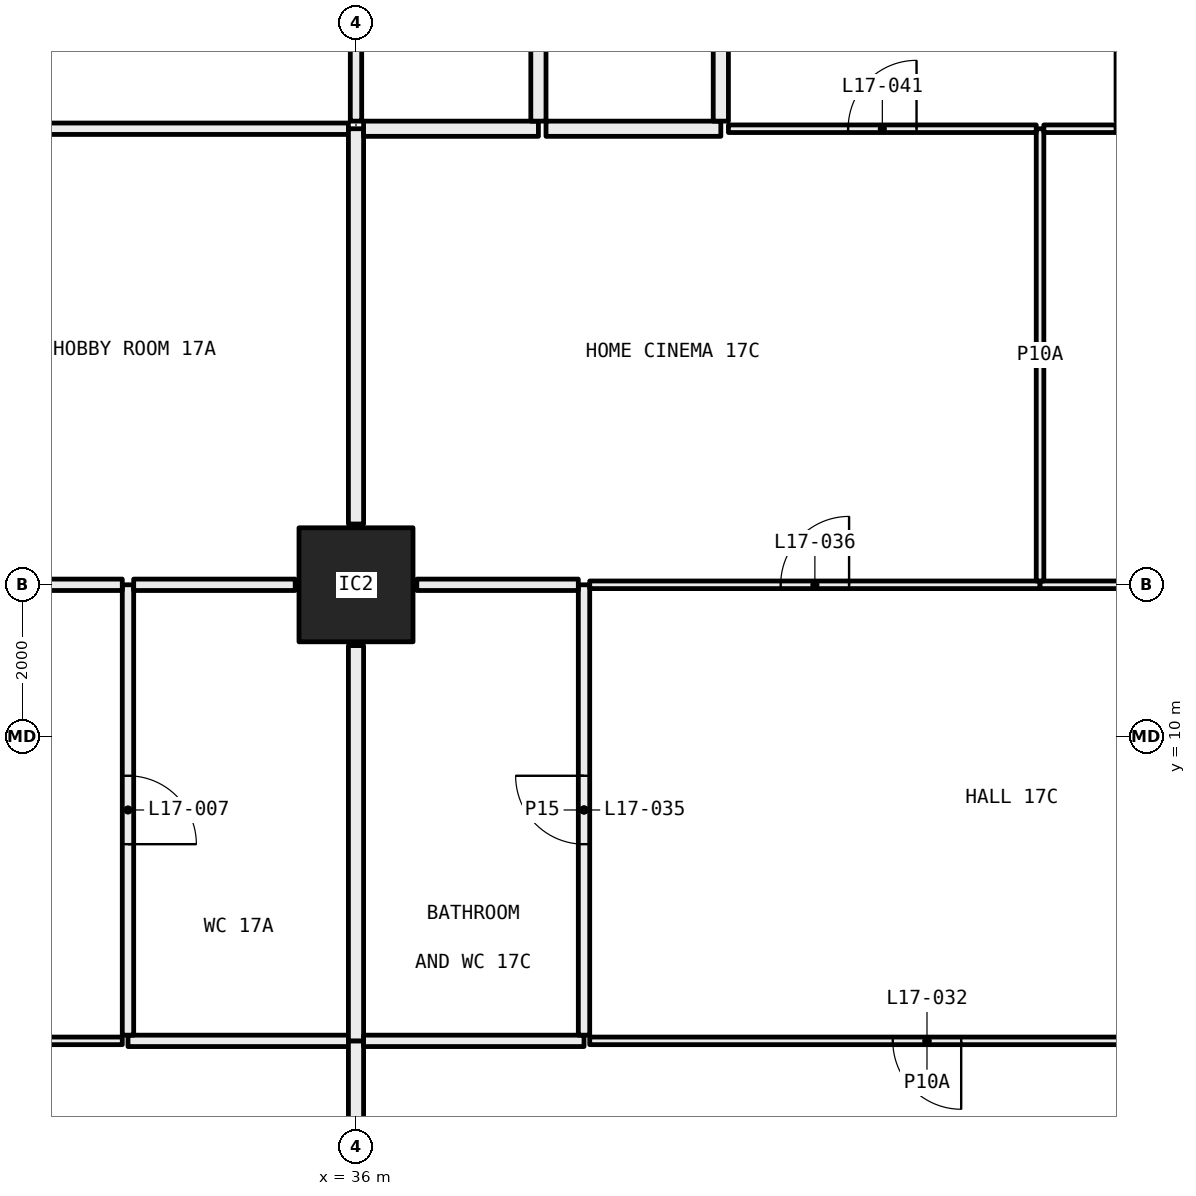
"""IFC4 building model, lengths in metres.
Left out: names, types, materials, properties, quantities, classifications, styles, units other than length and angle.
Written with IfcOpenShell. Run it as: python <this file> out.ifc"""

import sys

from ifc_helpers import new_model, si_unit, direction, frame, frame_2d, origin, origin_2d, place, context, subcontext, project, spatial, rectangle, hollow_rectangle, extrude, element, fill, save


model = new_model("IFC4")
c1 = context("Model", 3, precision=1e-05, world=origin(), true_north=direction((0.0, 1.0)))
c2 = subcontext(c1, "Body", "Model", "MODEL_VIEW")
j1 = project(units=[si_unit("LENGTHUNIT", "METRE"), si_unit("PLANEANGLEUNIT", "RADIAN")], contexts=[c1])
p1 = place(None, origin())
s1 = spatial("IfcSite", under=j1, at=p1, CompositionType="ELEMENT")
p2 = place(p1, origin())
s2 = spatial("IfcBuilding", under=s1, at=p2, CompositionType="ELEMENT")
p3 = place(p2, frame((0.0, 0.0, 71.4)))
s3 = spatial("IfcBuildingStorey", under=s2, at=p3, CompositionType="ELEMENT", Elevation=71.4)
p4 = place(p3, frame((36.0, 12.0, 0.0), z_axis=(0.0, 0.0, 1.0), x_axis=(1.0, 0.0, 0.0)))
e1 = element("IfcColumn", 1, at=p4, inside=s3, PredefinedType="COLUMN", context=c2, shape_type="SweptSolid", body=[
    extrude(hollow_rectangle(XDim=1.5, YDim=1.5, WallThickness=0.065, at=origin_2d()), origin(), (0.0, 0.0, 1.0), 3.05),
])
p5 = place(p3, frame((32.925, 6.0, 0.0), z_axis=(0.0, 0.0, 1.0), x_axis=(-1.0, 0.0, 0.0)))
e2 = element("IfcWall", 2, at=p5, inside=s3, PredefinedType="PARTITIONING", context=c2, shape_type="SweptSolid", body=[
    extrude(rectangle(XDim=2.875, YDim=0.1, at=frame_2d((1.438, 0.0))), origin(), (0.0, 0.0, 1.0), 3.05),
])
p6 = place(p3, frame((35.9, 6.0, 0.0), z_axis=(0.0, 0.0, 1.0), x_axis=(-1.0, 0.0, 0.0)))
e3 = element("IfcWall", 3, at=p6, inside=s3, PredefinedType="PARTITIONING", context=c2, shape_type="SweptSolid", body=[
    extrude(rectangle(XDim=2.9, YDim=0.15, at=frame_2d((1.45, 0.0))), origin(), (0.0, 0.0, 1.0), 3.05),
])
p7 = place(p3, frame((36.0, 0.72, 0.0), z_axis=(0.0, 0.0, 1.0), x_axis=(0.0, 1.0, 0.0)))
e4 = element("IfcWall", 4, at=p7, inside=s3, PredefinedType="PARTITIONING", context=c2, shape_type="SweptSolid", body=[
    extrude(rectangle(XDim=5.28, YDim=0.2, at=frame_2d((2.64, 0.0))), origin(), (0.0, 0.0, 1.0), 2.45),
])
p8 = place(p3, frame((33.0, 6.075, 0.0), z_axis=(0.0, 0.0, 1.0), x_axis=(0.0, 1.0, 0.0)))
e5 = element("IfcWall", 5, at=p8, inside=s3, PredefinedType="PARTITIONING", context=c2, shape_type="SweptSolid", body=[
    extrude(rectangle(XDim=5.925, YDim=0.15, at=frame_2d((2.962, 0.0))), origin(), (0.0, 0.0, 1.0), 2.45),
])
p9 = place(p8, frame((2.512, 0.0, 0.0)))
e6 = element("IfcOpeningElement", 6, at=p9, cuts=e5, PredefinedType="OPENING", context=c2, shape_type="SweptSolid", body=[
    extrude(rectangle(XDim=0.9, YDim=2.1, at=frame_2d((0.45, 1.05))), frame((0.0, 0.085, 0.0), z_axis=(0.0, -1.0, 0.0), x_axis=(1.0, 0.0, 0.0)), (0.0, 0.0, 1.0), 0.17),
])
p10 = place(p3, frame((32.925, 12.0, 0.0), z_axis=(0.0, 0.0, 1.0), x_axis=(-1.0, 0.0, 0.0)))
e7 = element("IfcWall", 7, at=p10, inside=s3, PredefinedType="PARTITIONING", context=c2, shape_type="SweptSolid", body=[
    extrude(rectangle(XDim=2.925, YDim=0.15, at=frame_2d((1.462, 0.0))), origin(), (0.0, 0.0, 1.0), 2.45),
])
p11 = place(p10, frame((1.012, 0.0, 0.0)))
e8 = element("IfcOpeningElement", 8, at=p11, cuts=e7, PredefinedType="OPENING", context=c2, shape_type="SweptSolid", body=[
    extrude(rectangle(XDim=0.9, YDim=2.1, at=frame_2d((0.45, 1.05))), frame((0.0, 0.085, 0.0), z_axis=(0.0, -1.0, 0.0), x_axis=(1.0, 0.0, 0.0)), (0.0, 0.0, 1.0), 0.17),
])
p12 = place(p3, frame((35.2, 12.0, 0.0), z_axis=(0.0, 0.0, 1.0), x_axis=(-1.0, 0.0, 0.0)))
e9 = element("IfcWall", 9, at=p12, inside=s3, PredefinedType="PARTITIONING", context=c2, shape_type="SweptSolid", body=[
    extrude(rectangle(XDim=2.125, YDim=0.15, at=frame_2d((1.062, 0.0))), origin(), (0.0, 0.0, 1.0), 2.45),
])
p13 = place(p3, frame((36.0, 6.0, 0.0), z_axis=(0.0, 0.0, 1.0), x_axis=(0.0, 1.0, 0.0)))
e10 = element("IfcWall", 10, at=p13, inside=s3, PredefinedType="PARTITIONING", context=c2, shape_type="SweptSolid", body=[
    extrude(rectangle(XDim=5.2, YDim=0.2, at=frame_2d((2.6, 0.0))), origin(), (0.0, 0.0, 1.0), 2.45),
])
p14 = place(p3, frame((35.9, 18.0, 0.0), z_axis=(0.0, 0.0, 1.0), x_axis=(-1.0, 0.0, 0.0)))
e11 = element("IfcWall", 11, at=p14, inside=s3, PredefinedType="PARTITIONING", context=c2, shape_type="SweptSolid", body=[
    extrude(rectangle(XDim=4.4, YDim=0.15, at=frame_2d((2.2, 0.0))), origin(), (0.0, 0.0, 1.0), 3.05),
])
p15 = place(p3, frame((36.0, 12.8, 0.0), z_axis=(0.0, 0.0, 1.0), x_axis=(0.0, 1.0, 0.0)))
e12 = element("IfcWall", 12, at=p15, inside=s3, PredefinedType="PARTITIONING", context=c2, shape_type="SweptSolid", body=[
    extrude(rectangle(XDim=5.2, YDim=0.2, at=frame_2d((2.6, 0.0))), origin(), (0.0, 0.0, 1.0), 2.45),
])
p16 = place(p3, frame((36.0, 18.1, 0.0), z_axis=(0.0, 0.0, 1.0), x_axis=(0.0, 1.0, 0.0)))
e13 = element("IfcWall", 13, at=p16, inside=s3, PredefinedType="PARTITIONING", context=c2, shape_type="SweptSolid", body=[
    extrude(rectangle(XDim=5.1, YDim=0.15, at=frame_2d((2.55, 0.0))), origin(), (0.0, 0.0, 1.0), 2.45),
])
p17 = place(p16, frame((2.1, 0.0, 0.0)))
e14 = element("IfcOpeningElement", 14, at=p17, cuts=e13, PredefinedType="OPENING", context=c2, shape_type="SweptSolid", body=[
    extrude(rectangle(XDim=0.9, YDim=2.1, at=frame_2d((0.45, 1.05))), frame((0.0, 0.085, 0.0), z_axis=(0.0, -1.0, 0.0), x_axis=(1.0, 0.0, 0.0)), (0.0, 0.0, 1.0), 0.17),
])
p18 = place(p3, frame((36.1, 18.0, 0.0), z_axis=(0.0, 0.0, 1.0), x_axis=(1.0, 0.0, 0.0)))
e15 = element("IfcWall", 15, at=p18, inside=s3, PredefinedType="PARTITIONING", context=c2, shape_type="SweptSolid", body=[
    extrude(rectangle(XDim=2.3, YDim=0.2, at=frame_2d((1.15, 0.0))), origin(), (0.0, 0.0, 1.0), 3.05),
])
p19 = place(p3, frame((38.4, 18.1, 0.0), z_axis=(0.0, 0.0, 1.0), x_axis=(0.0, 1.0, 0.0)))
e16 = element("IfcWall", 16, at=p19, inside=s3, PredefinedType="PARTITIONING", context=c2, shape_type="SweptSolid", body=[
    extrude(rectangle(XDim=6.2, YDim=0.2, at=frame_2d((3.1, 0.0))), origin(), (0.0, 0.0, 1.0), 2.45),
])
p20 = place(p3, frame((39.0, 6.0, 0.0), z_axis=(0.0, 0.0, 1.0), x_axis=(-1.0, 0.0, 0.0)))
e17 = element("IfcWall", 17, at=p20, inside=s3, PredefinedType="PARTITIONING", context=c2, shape_type="SweptSolid", body=[
    extrude(rectangle(XDim=2.9, YDim=0.15, at=frame_2d((1.45, 0.0))), origin(), (0.0, 0.0, 1.0), 3.05),
])
p21 = place(p3, frame((47.95, 6.0, 0.0), z_axis=(0.0, 0.0, 1.0), x_axis=(-1.0, 0.0, 0.0)))
e18 = element("IfcWall", 18, at=p21, inside=s3, PredefinedType="PARTITIONING", context=c2, shape_type="SweptSolid", body=[
    extrude(rectangle(XDim=8.875, YDim=0.1, at=frame_2d((4.438, 0.0))), origin(), (0.0, 0.0, 1.0), 2.45),
])
p22 = place(p21, frame((3.988, 0.0, 0.0)))
e19 = element("IfcOpeningElement", 19, at=p22, cuts=e18, PredefinedType="OPENING", context=c2, shape_type="SweptSolid", body=[
    extrude(rectangle(XDim=0.9, YDim=2.1, at=frame_2d((0.45, 1.05))), frame((0.0, 0.06, 0.0), z_axis=(0.0, -1.0, 0.0), x_axis=(1.0, 0.0, 0.0)), (0.0, 0.0, 1.0), 0.12),
])
p23 = place(p3, frame((39.0, 6.075, 0.0), z_axis=(0.0, 0.0, 1.0), x_axis=(0.0, 1.0, 0.0)))
e20 = element("IfcWall", 20, at=p23, inside=s3, PredefinedType="PARTITIONING", context=c2, shape_type="SweptSolid", body=[
    extrude(rectangle(XDim=5.925, YDim=0.15, at=frame_2d((2.962, 0.0))), origin(), (0.0, 0.0, 1.0), 2.45),
])
p24 = place(p23, frame((2.512, 0.0, 0.0)))
e21 = element("IfcOpeningElement", 21, at=p24, cuts=e20, PredefinedType="OPENING", context=c2, shape_type="SweptSolid", body=[
    extrude(rectangle(XDim=0.9, YDim=2.1, at=frame_2d((0.45, 1.05))), frame((0.0, 0.085, 0.0), z_axis=(0.0, -1.0, 0.0), x_axis=(1.0, 0.0, 0.0)), (0.0, 0.0, 1.0), 0.17),
])
p25 = place(p3, frame((38.925, 12.0, 0.0), z_axis=(0.0, 0.0, 1.0), x_axis=(-1.0, 0.0, 0.0)))
e22 = element("IfcWall", 22, at=p25, inside=s3, PredefinedType="PARTITIONING", context=c2, shape_type="SweptSolid", body=[
    extrude(rectangle(XDim=2.125, YDim=0.15, at=frame_2d((1.062, 0.0))), origin(), (0.0, 0.0, 1.0), 2.45),
])
p26 = place(p3, frame((45.0, 12.0, 0.0), z_axis=(0.0, 0.0, 1.0), x_axis=(-1.0, 0.0, 0.0)))
e23 = element("IfcWall", 23, at=p26, inside=s3, PredefinedType="PARTITIONING", context=c2, shape_type="SweptSolid", body=[
    extrude(rectangle(XDim=5.925, YDim=0.1, at=frame_2d((2.962, 0.0))), origin(), (0.0, 0.0, 1.0), 2.45),
])
p27 = place(p26, frame((2.512, 0.0, 0.0)))
e24 = element("IfcOpeningElement", 24, at=p27, cuts=e23, PredefinedType="OPENING", context=c2, shape_type="SweptSolid", body=[
    extrude(rectangle(XDim=0.9, YDim=2.1, at=frame_2d((0.45, 1.05))), frame((0.0, 0.06, 0.0), z_axis=(0.0, -1.0, 0.0), x_axis=(1.0, 0.0, 0.0)), (0.0, 0.0, 1.0), 0.12),
])
p28 = place(p3, frame((47.2, 12.0, 0.0), z_axis=(0.0, 0.0, 1.0), x_axis=(-1.0, 0.0, 0.0)))
e25 = element("IfcWall", 25, at=p28, inside=s3, PredefinedType="PARTITIONING", context=c2, shape_type="SweptSolid", body=[
    extrude(rectangle(XDim=2.2, YDim=0.1, at=frame_2d((1.1, 0.0))), origin(), (0.0, 0.0, 1.0), 2.45),
])
p29 = place(p3, frame((45.0, 12.05, 0.0), z_axis=(0.0, 0.0, 1.0), x_axis=(0.0, 1.0, 0.0)))
e26 = element("IfcWall", 26, at=p29, inside=s3, PredefinedType="PARTITIONING", context=c2, shape_type="SweptSolid", body=[
    extrude(rectangle(XDim=5.95, YDim=0.1, at=frame_2d((2.975, 0.0))), origin(), (0.0, 0.0, 1.0), 2.45),
])
p30 = place(p3, frame((44.95, 18.0, 0.0), z_axis=(0.0, 0.0, 1.0), x_axis=(-1.0, 0.0, 0.0)))
e27 = element("IfcWall", 27, at=p30, inside=s3, PredefinedType="PARTITIONING", context=c2, shape_type="SweptSolid", body=[
    extrude(rectangle(XDim=4.05, YDim=0.1, at=frame_2d((2.025, 0.0))), origin(), (0.0, 0.0, 1.0), 3.05),
])
p31 = place(p30, frame((1.575, 0.0, 0.0)))
e28 = element("IfcOpeningElement", 28, at=p31, cuts=e27, PredefinedType="OPENING", context=c2, shape_type="SweptSolid", body=[
    extrude(rectangle(XDim=0.9, YDim=2.1, at=frame_2d((0.45, 1.05))), frame((0.0, 0.06, 0.0), z_axis=(0.0, -1.0, 0.0), x_axis=(1.0, 0.0, 0.0)), (0.0, 0.0, 1.0), 0.12),
])
p32 = place(p3, frame((40.8, 18.0, 0.0), z_axis=(0.0, 0.0, 1.0), x_axis=(-1.0, 0.0, 0.0)))
e29 = element("IfcWall", 29, at=p32, inside=s3, PredefinedType="PARTITIONING", context=c2, shape_type="SweptSolid", body=[
    extrude(rectangle(XDim=2.3, YDim=0.2, at=frame_2d((1.15, 0.0))), origin(), (0.0, 0.0, 1.0), 3.05),
])
p33 = place(p3, frame((46.0, 18.0, 0.0), z_axis=(0.0, 0.0, 1.0), x_axis=(-1.0, 0.0, 0.0)))
e30 = element("IfcWall", 30, at=p33, inside=s3, PredefinedType="PARTITIONING", context=c2, shape_type="SweptSolid", body=[
    extrude(rectangle(XDim=0.95, YDim=0.1, at=frame_2d((0.475, 0.0))), origin(), (0.0, 0.0, 1.0), 3.05),
])
p34 = place(p3, frame((40.8, 23.9, 0.0), z_axis=(0.0, 0.0, 1.0), x_axis=(0.0, -1.0, 0.0)))
e31 = element("IfcWall", 31, at=p34, inside=s3, PredefinedType="PARTITIONING", context=c2, shape_type="SweptSolid", body=[
    extrude(rectangle(XDim=5.8, YDim=0.2, at=frame_2d((2.9, 0.0))), origin(), (0.0, 0.0, 1.0), 3.05),
])
p35 = place(p9, frame((0.9, 0.0, 0.0), x_axis=(-1.0, 0.0, 0.0)))
e32 = element("IfcDoor", 32, at=p35, inside=s3, OperationType="SINGLE_SWING_LEFT", PredefinedType="DOOR", context=c2, shape_type="SweptSolid", body=[
    extrude(rectangle(XDim=0.9, YDim=2.1, at=frame_2d((0.45, 1.05))), frame((0.0, 0.025, 0.0), z_axis=(0.0, -1.0, 0.0), x_axis=(1.0, 0.0, 0.0)), (0.0, 0.0, 1.0), 0.05),
])
fill(e6, e32)
p36 = place(p22, origin())
e33 = element("IfcDoor", 33, at=p36, inside=s3, OperationType="SINGLE_SWING_RIGHT", PredefinedType="DOOR", context=c2, shape_type="SweptSolid", body=[
    extrude(rectangle(XDim=0.9, YDim=2.1, at=frame_2d((0.45, 1.05))), frame((0.0, 0.025, 0.0), z_axis=(0.0, -1.0, 0.0), x_axis=(1.0, 0.0, 0.0)), (0.0, 0.0, 1.0), 0.05),
])
fill(e19, e33)
p37 = place(p24, origin())
e34 = element("IfcDoor", 34, at=p37, inside=s3, OperationType="SINGLE_SWING_LEFT", PredefinedType="DOOR", context=c2, shape_type="SweptSolid", body=[
    extrude(rectangle(XDim=0.9, YDim=2.1, at=frame_2d((0.45, 1.05))), frame((0.0, 0.025, 0.0), z_axis=(0.0, -1.0, 0.0), x_axis=(1.0, 0.0, 0.0)), (0.0, 0.0, 1.0), 0.05),
])
fill(e21, e34)
p38 = place(p27, frame((0.9, 0.0, 0.0), x_axis=(-1.0, 0.0, 0.0)))
e35 = element("IfcDoor", 35, at=p38, inside=s3, OperationType="SINGLE_SWING_LEFT", PredefinedType="DOOR", context=c2, shape_type="SweptSolid", body=[
    extrude(rectangle(XDim=0.9, YDim=2.1, at=frame_2d((0.45, 1.05))), frame((0.0, 0.025, 0.0), z_axis=(0.0, -1.0, 0.0), x_axis=(1.0, 0.0, 0.0)), (0.0, 0.0, 1.0), 0.05),
])
fill(e24, e35)
p39 = place(p31, frame((0.9, 0.0, 0.0), x_axis=(-1.0, 0.0, 0.0)))
e36 = element("IfcDoor", 36, at=p39, inside=s3, OperationType="SINGLE_SWING_LEFT", PredefinedType="DOOR", context=c2, shape_type="SweptSolid", body=[
    extrude(rectangle(XDim=0.9, YDim=2.1, at=frame_2d((0.45, 1.05))), frame((0.0, 0.025, 0.0), z_axis=(0.0, -1.0, 0.0), x_axis=(1.0, 0.0, 0.0)), (0.0, 0.0, 1.0), 0.05),
])
fill(e28, e36)
save(model, sys.argv[1])
